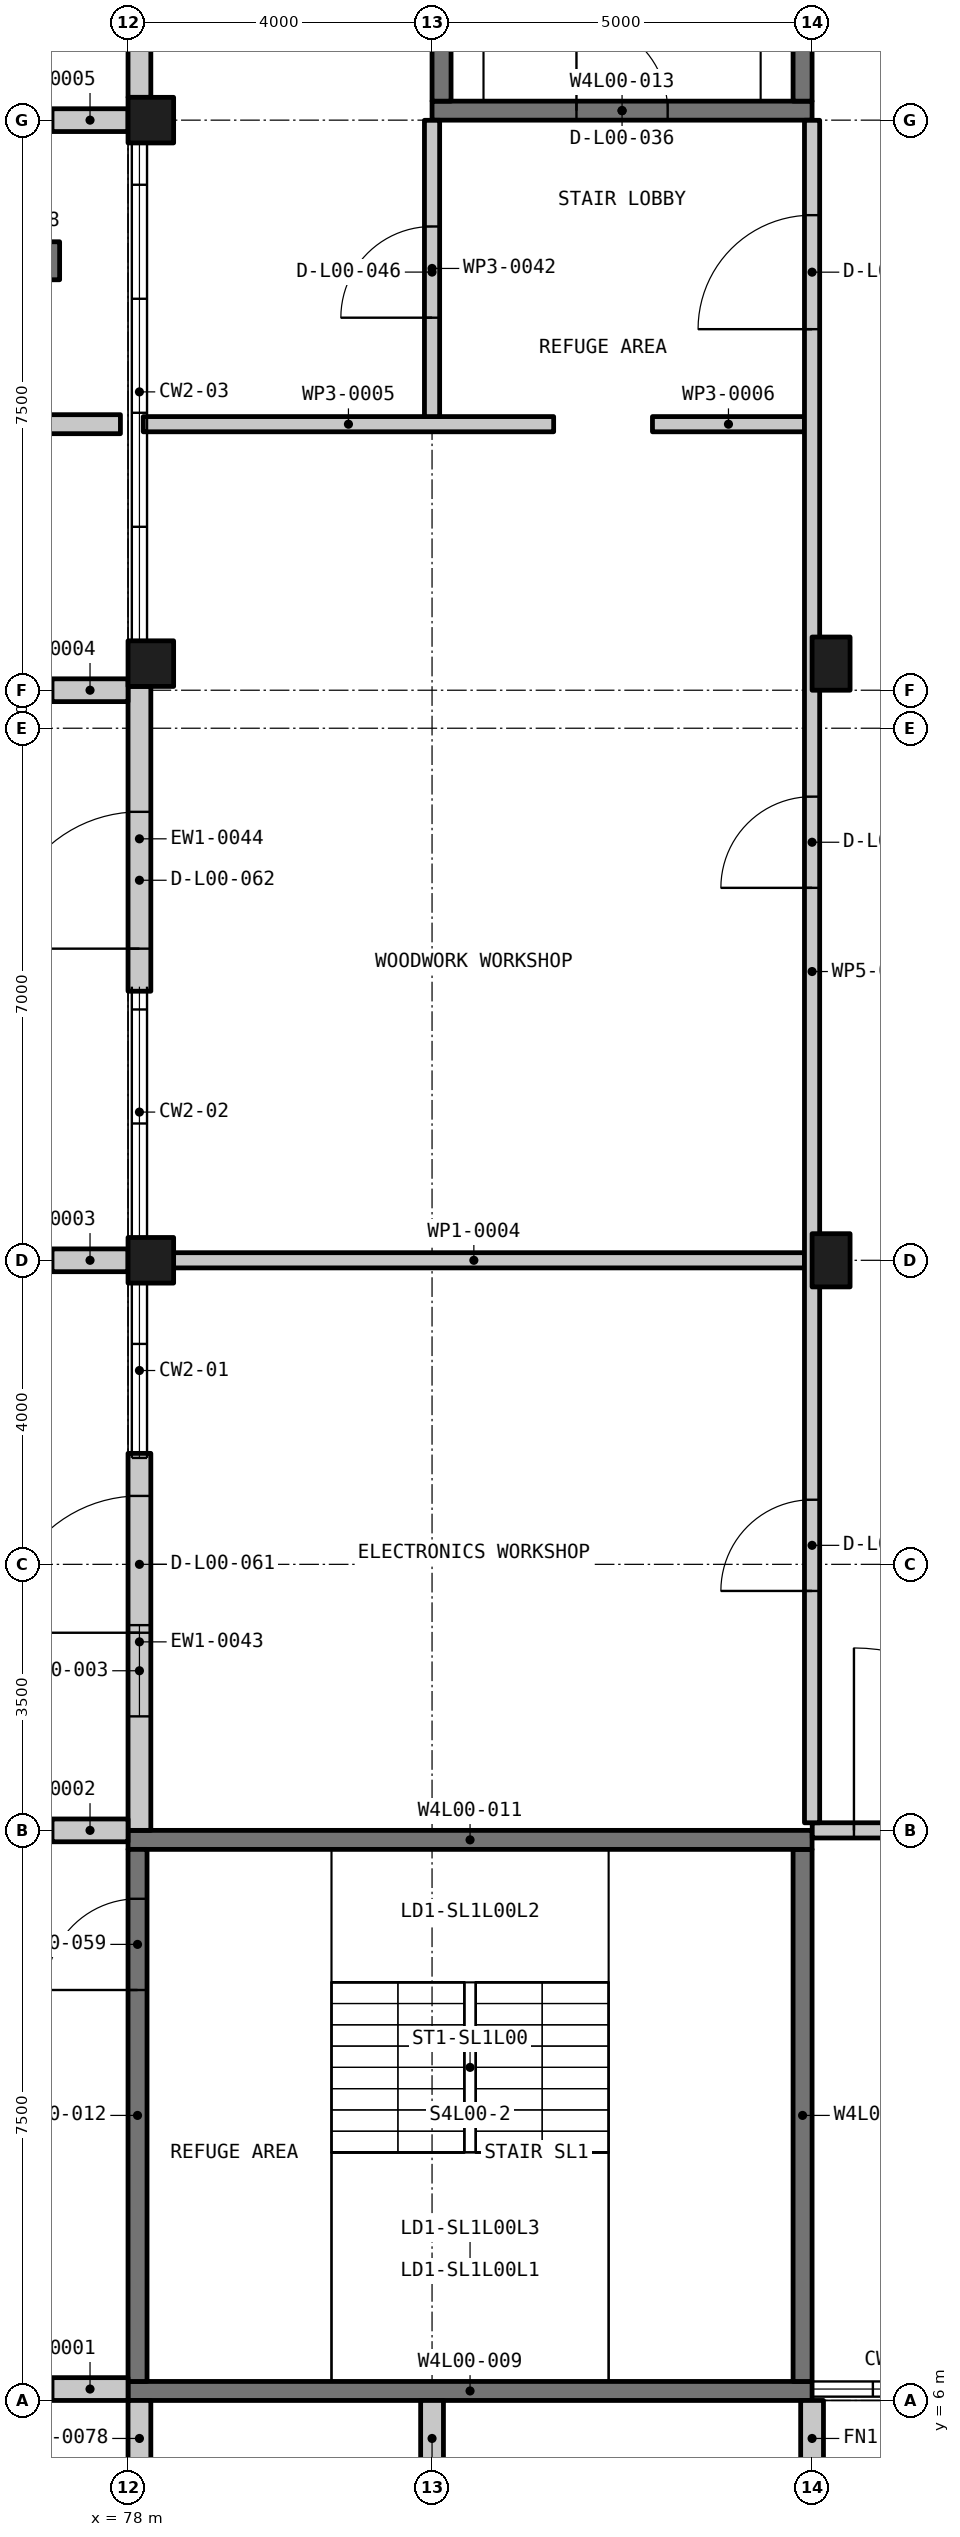
"""IFC4 building model, lengths in metres.
Left out: names, types, materials, properties, quantities, classifications, styles, units other than length and angle.
Written with IfcOpenShell. Run it as: python <this file> out.ifc"""

import sys

from ifc_helpers import new_model, si_unit, direction, frame, frame_2d, origin, origin_2d, place, context, subcontext, project, spatial, rectangle, extrude, element, fill, save


model = new_model("IFC4")
c1 = context("Model", 3, precision=1e-05, world=origin(), true_north=direction((0.0, 1.0)))
c2 = subcontext(c1, "Body", "Model", "MODEL_VIEW")
j1 = project(units=[si_unit("LENGTHUNIT", "METRE"), si_unit("PLANEANGLEUNIT", "RADIAN")], contexts=[c1])
p1 = place(None, origin())
s1 = spatial("IfcSite", under=j1, at=p1, CompositionType="ELEMENT")
p2 = place(p1, origin())
s2 = spatial("IfcBuilding", under=s1, at=p2, CompositionType="ELEMENT")
p3 = place(p2, origin())
s3 = spatial("IfcBuildingStorey", under=s2, at=p3, CompositionType="ELEMENT", Elevation=0.0)
for number, where, z_axis, x_axis in (
    (1, (78.3, 21.0, -0.2), (0.0, 0.0, 1.0), (1.0, 0.0, 0.0)),
    (2, (78.3, 28.85, -0.2), (0.0, 0.0, 1.0), (1.0, 0.0, 0.0)),
    (3, (78.3, 36.0, -0.2), (0.0, 0.0, 1.0), (1.0, 0.0, 0.0)),
):
    element("IfcColumn", number, at=place(p3, frame(where, z_axis=z_axis, x_axis=x_axis)), inside=s3, PredefinedType="COLUMN", context=c2, shape_type="SweptSolid", body=[
        extrude(rectangle(XDim=0.6, YDim=0.6, at=origin_2d()), origin(), (0.0, 0.0, 1.0), 5.9),
    ])
for number, where, z_axis, x_axis in (
    (4, (87.25, 21.0, -0.2), (0.0, 0.0, 1.0), (1.0, 0.0, 0.0)),
    (5, (87.25, 28.85, -0.2), (0.0, 0.0, 1.0), (1.0, 0.0, 0.0)),
):
    element("IfcColumn", number, at=place(p3, frame(where, z_axis=z_axis, x_axis=x_axis)), inside=s3, PredefinedType="COLUMN", context=c2, shape_type="SweptSolid", body=[
        extrude(rectangle(XDim=0.5, YDim=0.7, at=origin_2d()), origin(), (0.0, 0.0, 1.0), 5.9),
    ])
p4 = place(p3, frame((78.0, 6.125, -0.2), z_axis=(0.0, 0.0, 1.0), x_axis=(1.0, 0.0, 0.0)))
e6 = element("IfcWall", 6, at=p4, inside=s3, PredefinedType="SHEAR", context=c2, shape_type="SweptSolid", body=[
    extrude(rectangle(XDim=9.0, YDim=0.25, at=frame_2d((4.5, 0.0))), origin(), (0.0, 0.0, 1.0), 5.9),
])
p5 = place(p3, frame((86.875, 6.25, -0.2), z_axis=(0.0, 0.0, 1.0), x_axis=(0.0, 1.0, 0.0)))
e7 = element("IfcWall", 7, at=p5, inside=s3, PredefinedType="SHEAR", context=c2, shape_type="SweptSolid", body=[
    extrude(rectangle(XDim=7.0, YDim=0.25, at=frame_2d((3.5, 0.0))), origin(), (0.0, 0.0, 1.0), 5.9),
])
p6 = place(p3, frame((78.0, 13.375, -0.2), z_axis=(0.0, 0.0, 1.0), x_axis=(1.0, 0.0, 0.0)))
e8 = element("IfcWall", 8, at=p6, inside=s3, PredefinedType="SHEAR", context=c2, shape_type="SweptSolid", body=[
    extrude(rectangle(XDim=9.0, YDim=0.25, at=frame_2d((4.5, 0.0))), origin(), (0.0, 0.0, 1.0), 5.9),
])
p7 = place(p3, frame((78.125, 6.25, -0.2), z_axis=(0.0, 0.0, 1.0), x_axis=(0.0, 1.0, 0.0)))
e9 = element("IfcWall", 9, at=p7, inside=s3, PredefinedType="SHEAR", context=c2, shape_type="SweptSolid", body=[
    extrude(rectangle(XDim=7.0, YDim=0.25, at=frame_2d((3.5, 0.0))), origin(), (0.0, 0.0, 1.0), 5.9),
])
p8 = place(p7, frame((5.15, 0.0, 0.2)))
e10 = element("IfcOpeningElement", 10, at=p8, cuts=e9, PredefinedType="OPENING", context=c2, shape_type="SweptSolid", body=[
    extrude(rectangle(XDim=1.2, YDim=2.2, at=frame_2d((0.6, 1.1))), frame((0.0, 0.135, 0.0), z_axis=(0.0, -1.0, 0.0), x_axis=(1.0, 0.0, 0.0)), (0.0, 0.0, 1.0), 0.27),
])
p9 = place(p3, frame((82.0, 36.125, -0.2), z_axis=(0.0, 0.0, 1.0), x_axis=(1.0, 0.0, 0.0)))
e11 = element("IfcWall", 11, at=p9, inside=s3, PredefinedType="SHEAR", context=c2, shape_type="SweptSolid", body=[
    extrude(rectangle(XDim=5.0, YDim=0.25, at=frame_2d((2.5, 0.0))), origin(), (0.0, 0.0, 1.0), 5.9),
])
p10 = place(p9, frame((1.9, 0.0, 0.2)))
e12 = element("IfcOpeningElement", 12, at=p10, cuts=e11, PredefinedType="OPENING", context=c2, shape_type="SweptSolid", body=[
    extrude(rectangle(XDim=1.2, YDim=2.2, at=frame_2d((0.6, 1.1))), frame((0.0, 0.135, 0.0), z_axis=(0.0, -1.0, 0.0), x_axis=(1.0, 0.0, 0.0)), (0.0, 0.0, 1.0), 0.27),
])
for number, where, z_axis, x_axis in (
    (13, (86.875, 36.25, -0.2), (0.0, 0.0, 1.0), (0.0, 1.0, 0.0)),
    (14, (82.125, 36.25, -0.2), (0.0, 0.0, 1.0), (0.0, 1.0, 0.0)),
):
    element("IfcWall", number, at=place(p3, frame(where, z_axis=z_axis, x_axis=x_axis)), inside=s3, PredefinedType="SHEAR", context=c2, shape_type="SweptSolid", body=[
        extrude(rectangle(XDim=7.0, YDim=0.25, at=frame_2d((3.5, 0.0))), origin(), (0.0, 0.0, 1.0), 5.9),
    ])
p11 = place(p3, frame((78.15, 13.5, 0.0), z_axis=(0.0, 0.0, 1.0), x_axis=(0.0, 1.0, 0.0)))
e15 = element("IfcWall", 15, at=p11, inside=s3, PredefinedType="SOLIDWALL", context=c2, shape_type="SweptSolid", body=[
    extrude(rectangle(XDim=4.96, YDim=0.3, at=frame_2d((2.48, 0.0))), origin(), (0.0, 0.0, 1.0), 4.9),
])
p12 = place(p11, frame((2.6, 0.0, 0.0)))
e16 = element("IfcOpeningElement", 16, at=p12, cuts=e15, PredefinedType="OPENING", context=c2, shape_type="SweptSolid", body=[
    extrude(rectangle(XDim=1.8, YDim=2.2, at=frame_2d((0.9, 1.1))), frame((0.0, 0.16, 0.0), z_axis=(0.0, -1.0, 0.0), x_axis=(1.0, 0.0, 0.0)), (0.0, 0.0, 1.0), 0.32),
])
p13 = place(p11, frame((1.5, 0.0, 2.4)))
e17 = element("IfcOpeningElement", 17, at=p13, cuts=e15, PredefinedType="OPENING", context=c2, shape_type="SweptSolid", body=[
    extrude(rectangle(XDim=1.2, YDim=0.6, at=frame_2d((0.6, 0.3))), frame((0.0, 0.16, 0.0), z_axis=(0.0, -1.0, 0.0), x_axis=(1.0, 0.0, 0.0)), (0.0, 0.0, 1.0), 0.32),
])
p14 = place(p3, frame((78.15, 24.54, 0.0), z_axis=(0.0, 0.0, 1.0), x_axis=(0.0, 1.0, 0.0)))
e18 = element("IfcWall", 18, at=p14, inside=s3, PredefinedType="SOLIDWALL", context=c2, shape_type="SweptSolid", body=[
    extrude(rectangle(XDim=4.01, YDim=0.3, at=frame_2d((2.005, 0.0))), origin(), (0.0, 0.0, 1.0), 4.9),
])
p15 = place(p14, frame((0.56, 0.0, 0.0)))
e19 = element("IfcOpeningElement", 19, at=p15, cuts=e18, PredefinedType="OPENING", context=c2, shape_type="SweptSolid", body=[
    extrude(rectangle(XDim=1.8, YDim=2.2, at=frame_2d((0.9, 1.1))), frame((0.0, 0.16, 0.0), z_axis=(0.0, -1.0, 0.0), x_axis=(1.0, 0.0, 0.0)), (0.0, 0.0, 1.0), 0.32),
])
p16 = place(p3, frame((78.15, 36.3, 0.0), z_axis=(0.0, 0.0, 1.0), x_axis=(0.0, 1.0, 0.0)))
e20 = element("IfcWall", 20, at=p16, inside=s3, PredefinedType="SOLIDWALL", context=c2, shape_type="SweptSolid", body=[
    extrude(rectangle(XDim=3.11, YDim=0.3, at=frame_2d((1.555, 0.0))), origin(), (0.0, 0.0, 1.0), 4.9),
])
p17 = place(p16, frame((1.35, 0.0, 0.0)))
e21 = element("IfcOpeningElement", 21, at=p17, cuts=e20, PredefinedType="OPENING", context=c2, shape_type="SweptSolid", body=[
    extrude(rectangle(XDim=1.2, YDim=2.2, at=frame_2d((0.6, 1.1))), frame((0.0, 0.16, 0.0), z_axis=(0.0, -1.0, 0.0), x_axis=(1.0, 0.0, 0.0)), (0.0, 0.0, 1.0), 0.32),
])
p18 = place(p3, frame((24.125, 32.0, 0.0), z_axis=(0.0, 0.0, 1.0), x_axis=(1.0, 0.0, 0.0)))
e22 = element("IfcWall", 22, at=p18, inside=s3, PredefinedType="SOLIDWALL", context=c2, shape_type="SweptSolid", body=[
    extrude(rectangle(XDim=53.775, YDim=0.25, at=frame_2d((26.887, 0.0))), origin(), (0.0, 0.0, 1.0), 4.5),
])
p19 = place(p18, frame((4.375, 0.0, 0.0)))
e23 = element("IfcOpeningElement", 23, at=p19, cuts=e22, PredefinedType="OPENING", context=c2, shape_type="SweptSolid", body=[
    extrude(rectangle(XDim=3.0, YDim=3.0, at=frame_2d((1.5, 1.5))), frame((0.0, 0.135, 0.0), z_axis=(0.0, -1.0, 0.0), x_axis=(1.0, 0.0, 0.0)), (0.0, 0.0, 1.0), 0.27),
])
p20 = place(p18, frame((24.875, 0.0, 0.0)))
e24 = element("IfcOpeningElement", 24, at=p20, cuts=e22, PredefinedType="OPENING", context=c2, shape_type="SweptSolid", body=[
    extrude(rectangle(XDim=4.0, YDim=3.0, at=frame_2d((2.0, 1.5))), frame((0.0, 0.135, 0.0), z_axis=(0.0, -1.0, 0.0), x_axis=(1.0, 0.0, 0.0)), (0.0, 0.0, 1.0), 0.27),
])
p21 = place(p18, frame((49.375, 0.0, 0.0)))
e25 = element("IfcOpeningElement", 25, at=p21, cuts=e22, PredefinedType="OPENING", context=c2, shape_type="SweptSolid", body=[
    extrude(rectangle(XDim=3.0, YDim=3.0, at=frame_2d((1.5, 1.5))), frame((0.0, 0.135, 0.0), z_axis=(0.0, -1.0, 0.0), x_axis=(1.0, 0.0, 0.0)), (0.0, 0.0, 1.0), 0.27),
])
p22 = place(p3, frame((75.9, 34.15, 0.0), z_axis=(0.0, 0.0, 1.0), x_axis=(1.0, 0.0, 0.0)))
e26 = element("IfcWall", 26, at=p22, inside=s3, PredefinedType="SOLIDWALL", context=c2, shape_type="SweptSolid", body=[
    extrude(rectangle(XDim=1.2, YDim=0.5, at=frame_2d((0.6, 0.0))), origin(), (0.0, 0.0, 1.0), 4.8),
])
for number, where, z_axis, x_axis in (
    (27, (77.0, 6.15, 0.0), (0.0, 0.0, 1.0), (1.0, 0.0, 0.0)),
    (28, (77.0, 13.5, 0.0), (0.0, 0.0, 1.0), (1.0, 0.0, 0.0)),
    (29, (77.0, 21.0, 0.0), (0.0, 0.0, 1.0), (1.0, 0.0, 0.0)),
    (30, (77.0, 28.5, 0.0), (0.0, 0.0, 1.0), (1.0, 0.0, 0.0)),
    (31, (77.0, 36.0, 0.0), (0.0, 0.0, 1.0), (1.0, 0.0, 0.0)),
    (32, (78.15, 6.0, 0.0), (0.0, 0.0, 1.0), (0.0, -1.0, 0.0)),
    (33, (82.0, 6.0, 0.0), (0.0, 0.0, 1.0), (0.0, -1.0, 0.0)),
    (34, (87.0, 6.0, 0.0), (0.0, 0.0, 1.0), (0.0, -1.0, 0.0)),
):
    element("IfcWall", number, at=place(p3, frame(where, z_axis=z_axis, x_axis=x_axis)), inside=s3, PredefinedType="SOLIDWALL", context=c2, shape_type="SweptSolid", body=[
        extrude(rectangle(XDim=1.0, YDim=0.3, at=frame_2d((0.5, 0.0))), origin(), (0.0, 0.0, 1.0), 6.0),
    ])
p23 = place(p3, frame((87.002, 13.5, 0.0), z_axis=(0.0, 0.0, 1.0), x_axis=(1.0, 0.0, 0.0)))
e35 = element("IfcWall", 35, at=p23, inside=s3, PredefinedType="PARTITIONING", context=c2, shape_type="SweptSolid", body=[
    extrude(rectangle(XDim=16.798, YDim=0.2, at=frame_2d((8.399, 0.0))), origin(), (0.0, 0.0, 1.0), 4.8),
])
p24 = place(p23, frame((0.549, 0.0, 0.0)))
e36 = element("IfcOpeningElement", 36, at=p24, cuts=e35, PredefinedType="OPENING", context=c2, shape_type="SweptSolid", body=[
    extrude(rectangle(XDim=2.4, YDim=2.1, at=frame_2d((1.2, 1.05))), frame((0.0, 0.11, 0.0), z_axis=(0.0, -1.0, 0.0), x_axis=(1.0, 0.0, 0.0)), (0.0, 0.0, 1.0), 0.22),
])
p25 = place(p3, frame((78.2, 21.0, 0.0), z_axis=(0.0, 0.0, 1.0), x_axis=(1.0, 0.0, 0.0)))
e37 = element("IfcWall", 37, at=p25, inside=s3, PredefinedType="PARTITIONING", context=c2, shape_type="SweptSolid", body=[
    extrude(rectangle(XDim=8.7, YDim=0.2, at=frame_2d((4.35, 0.0))), origin(), (0.0, 0.0, 1.0), 4.9),
])
p26 = place(p3, frame((78.2, 32.0, 0.0), z_axis=(0.0, 0.0, 1.0), x_axis=(1.0, 0.0, 0.0)))
e38 = element("IfcWall", 38, at=p26, inside=s3, PredefinedType="PARTITIONING", context=c2, shape_type="SweptSolid", body=[
    extrude(rectangle(XDim=5.4, YDim=0.2, at=frame_2d((2.7, 0.0))), origin(), (0.0, 0.0, 1.0), 4.9),
])
p27 = place(p3, frame((84.9, 32.0, 0.0), z_axis=(0.0, 0.0, 1.0), x_axis=(1.0, 0.0, 0.0)))
e39 = element("IfcWall", 39, at=p27, inside=s3, PredefinedType="PARTITIONING", context=c2, shape_type="SweptSolid", body=[
    extrude(rectangle(XDim=2.0, YDim=0.2, at=frame_2d((1.0, 0.0))), origin(), (0.0, 0.0, 1.0), 5.7),
])
p28 = place(p3, frame((87.0, 13.6, 0.0), z_axis=(0.0, 0.0, 1.0), x_axis=(0.0, 1.0, 0.0)))
e40 = element("IfcWall", 40, at=p28, inside=s3, PredefinedType="PARTITIONING", context=c2, shape_type="SweptSolid", body=[
    extrude(rectangle(XDim=22.398, YDim=0.2, at=frame_2d((11.199, 0.0))), origin(), (0.0, 0.0, 1.0), 4.8),
])
p29 = place(p28, frame((19.65, 0.0, 0.0)))
e41 = element("IfcOpeningElement", 41, at=p29, cuts=e40, PredefinedType="OPENING", context=c2, shape_type="SweptSolid", body=[
    extrude(rectangle(XDim=1.5, YDim=2.1, at=frame_2d((0.75, 1.05))), frame((0.0, 0.11, 0.0), z_axis=(0.0, -1.0, 0.0), x_axis=(1.0, 0.0, 0.0)), (0.0, 0.0, 1.0), 0.22),
])
p30 = place(p28, frame((3.05, 0.0, 0.0)))
e42 = element("IfcOpeningElement", 42, at=p30, cuts=e40, PredefinedType="OPENING", context=c2, shape_type="SweptSolid", body=[
    extrude(rectangle(XDim=1.2, YDim=2.1, at=frame_2d((0.6, 1.05))), frame((0.0, 0.11, 0.0), z_axis=(0.0, -1.0, 0.0), x_axis=(1.0, 0.0, 0.0)), (0.0, 0.0, 1.0), 0.22),
])
p31 = place(p28, frame((12.3, 0.0, 0.0)))
e43 = element("IfcOpeningElement", 43, at=p31, cuts=e40, PredefinedType="OPENING", context=c2, shape_type="SweptSolid", body=[
    extrude(rectangle(XDim=1.2, YDim=2.1, at=frame_2d((0.6, 1.05))), frame((0.0, 0.11, 0.0), z_axis=(0.0, -1.0, 0.0), x_axis=(1.0, 0.0, 0.0)), (0.0, 0.0, 1.0), 0.22),
])
p32 = place(p3, frame((82.0, 32.1, 0.0), z_axis=(0.0, 0.0, 1.0), x_axis=(0.0, 1.0, 0.0)))
e44 = element("IfcWall", 44, at=p32, inside=s3, PredefinedType="PARTITIONING", context=c2, shape_type="SweptSolid", body=[
    extrude(rectangle(XDim=3.898, YDim=0.2, at=frame_2d((1.949, 0.0))), origin(), (0.0, 0.0, 1.0), 4.9),
])
p33 = place(p32, frame((1.301, 0.0, 0.0)))
e45 = element("IfcOpeningElement", 45, at=p33, cuts=e44, PredefinedType="OPENING", context=c2, shape_type="SweptSolid", body=[
    extrude(rectangle(XDim=1.2, YDim=2.1, at=frame_2d((0.6, 1.05))), frame((0.0, 0.11, 0.0), z_axis=(0.0, -1.0, 0.0), x_axis=(1.0, 0.0, 0.0)), (0.0, 0.0, 1.0), 0.22),
])
p34 = place(p12, origin())
e46 = element("IfcDoor", 46, at=p34, inside=s3, OperationType="SINGLE_SWING_LEFT", PredefinedType="DOOR", context=c2, shape_type="SweptSolid", body=[
    extrude(rectangle(XDim=1.8, YDim=2.2, at=frame_2d((0.9, 1.1))), frame((0.0, 0.025, 0.0), z_axis=(0.0, -1.0, 0.0), x_axis=(1.0, 0.0, 0.0)), (0.0, 0.0, 1.0), 0.05),
])
fill(e16, e46)
p35 = place(p15, origin())
e47 = element("IfcDoor", 47, at=p35, inside=s3, OperationType="SINGLE_SWING_LEFT", PredefinedType="DOOR", context=c2, shape_type="SweptSolid", body=[
    extrude(rectangle(XDim=1.8, YDim=2.2, at=frame_2d((0.9, 1.1))), frame((0.0, 0.025, 0.0), z_axis=(0.0, -1.0, 0.0), x_axis=(1.0, 0.0, 0.0)), (0.0, 0.0, 1.0), 0.05),
])
fill(e19, e47)
p36 = place(p13, origin())
e48 = element("IfcWindow", 48, at=p36, inside=s3, PartitioningType="SINGLE_PANEL", PredefinedType="WINDOW", context=c2, shape_type="SweptSolid", body=[
    extrude(rectangle(XDim=1.2, YDim=0.6, at=frame_2d((0.6, 0.3))), frame((0.0, 0.03, 0.0), z_axis=(0.0, -1.0, 0.0), x_axis=(1.0, 0.0, 0.0)), (0.0, 0.0, 1.0), 0.06),
])
fill(e17, e48)
p37 = place(p8, origin())
e49 = element("IfcDoor", 49, at=p37, inside=s3, OperationType="SINGLE_SWING_LEFT", PredefinedType="DOOR", context=c2, shape_type="SweptSolid", body=[
    extrude(rectangle(XDim=1.2, YDim=2.2, at=frame_2d((0.6, 1.1))), frame((0.0, 0.025, 0.0), z_axis=(0.0, -1.0, 0.0), x_axis=(1.0, 0.0, 0.0)), (0.0, 0.0, 1.0), 0.05),
])
fill(e10, e49)
p38 = place(p10, origin())
e50 = element("IfcDoor", 50, at=p38, inside=s3, OperationType="SINGLE_SWING_LEFT", PredefinedType="DOOR", context=c2, shape_type="SweptSolid", body=[
    extrude(rectangle(XDim=1.2, YDim=2.2, at=frame_2d((0.6, 1.1))), frame((0.0, 0.025, 0.0), z_axis=(0.0, -1.0, 0.0), x_axis=(1.0, 0.0, 0.0)), (0.0, 0.0, 1.0), 0.05),
])
fill(e12, e50)
p39 = place(p29, origin())
e51 = element("IfcDoor", 51, at=p39, inside=s3, OperationType="DOUBLE_DOOR_SINGLE_SWING", PredefinedType="DOOR", context=c2, shape_type="SweptSolid", body=[
    extrude(rectangle(XDim=1.5, YDim=2.1, at=frame_2d((0.75, 1.05))), frame((0.0, 0.025, 0.0), z_axis=(0.0, -1.0, 0.0), x_axis=(1.0, 0.0, 0.0)), (0.0, 0.0, 1.0), 0.05),
])
fill(e41, e51)
p40 = place(p24, origin())
e52 = element("IfcDoor", 52, at=p40, inside=s3, OperationType="DOUBLE_DOOR_SINGLE_SWING", PredefinedType="DOOR", context=c2, shape_type="SweptSolid", body=[
    extrude(rectangle(XDim=2.4, YDim=2.1, at=frame_2d((1.2, 1.05))), frame((0.0, 0.025, 0.0), z_axis=(0.0, -1.0, 0.0), x_axis=(1.0, 0.0, 0.0)), (0.0, 0.0, 1.0), 0.05),
])
fill(e36, e52)
p41 = place(p30, origin())
e53 = element("IfcDoor", 53, at=p41, inside=s3, OperationType="SINGLE_SWING_RIGHT", PredefinedType="DOOR", context=c2, shape_type="SweptSolid", body=[
    extrude(rectangle(XDim=1.2, YDim=2.1, at=frame_2d((0.6, 1.05))), frame((0.0, 0.025, 0.0), z_axis=(0.0, -1.0, 0.0), x_axis=(1.0, 0.0, 0.0)), (0.0, 0.0, 1.0), 0.05),
])
fill(e42, e53)
p42 = place(p31, origin())
e54 = element("IfcDoor", 54, at=p42, inside=s3, OperationType="SINGLE_SWING_LEFT", PredefinedType="DOOR", context=c2, shape_type="SweptSolid", body=[
    extrude(rectangle(XDim=1.2, YDim=2.1, at=frame_2d((0.6, 1.05))), frame((0.0, 0.025, 0.0), z_axis=(0.0, -1.0, 0.0), x_axis=(1.0, 0.0, 0.0)), (0.0, 0.0, 1.0), 0.05),
])
fill(e43, e54)
p43 = place(p33, origin())
e55 = element("IfcDoor", 55, at=p43, inside=s3, OperationType="SINGLE_SWING_RIGHT", PredefinedType="DOOR", context=c2, shape_type="SweptSolid", body=[
    extrude(rectangle(XDim=1.2, YDim=2.1, at=frame_2d((0.6, 1.05))), frame((0.0, 0.025, 0.0), z_axis=(0.0, -1.0, 0.0), x_axis=(1.0, 0.0, 0.0)), (0.0, 0.0, 1.0), 0.05),
])
fill(e45, e55)
save(model, sys.argv[1])
